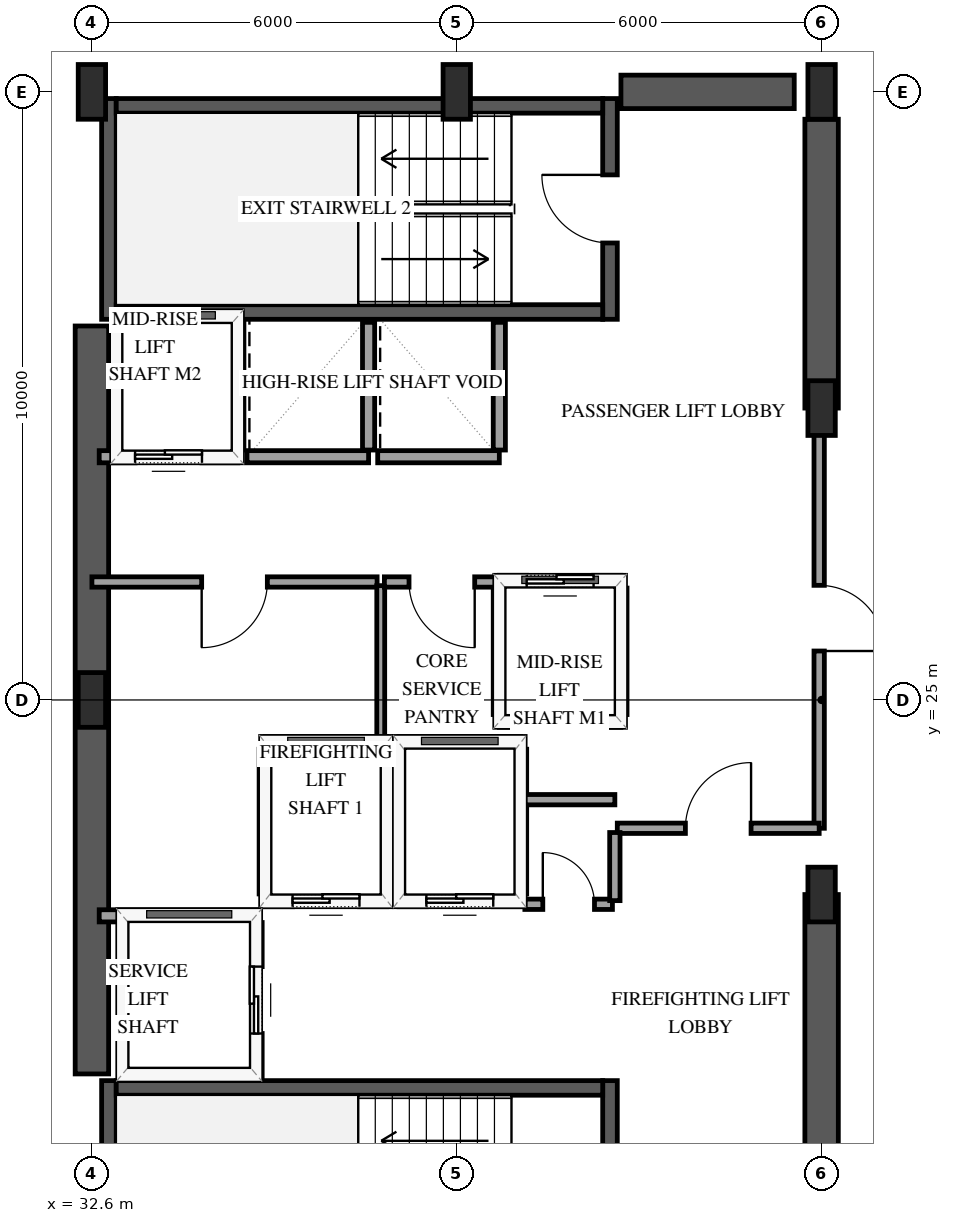
"""IFC4 building model, lengths in metres.
Left out: names, types, materials, properties, quantities, classifications, styles, units other than length and angle.
Written with IfcOpenShell. Run it as: python <this file> out.ifc"""

import sys

from ifc_helpers import new_model, si_unit, direction, frame, frame_2d, origin, origin_2d, place, context, subcontext, project, spatial, rectangle, extrude, element, fill, save


model = new_model("IFC4")
c1 = context("Model", 3, precision=1e-05, world=origin(), true_north=direction((0.0, 1.0)))
c2 = subcontext(c1, "Body", "Model", "MODEL_VIEW")
j1 = project(units=[si_unit("LENGTHUNIT", "METRE"), si_unit("PLANEANGLEUNIT", "RADIAN")], contexts=[c1])
p1 = place(None, origin())
s1 = spatial("IfcSite", under=j1, at=p1, CompositionType="ELEMENT")
p2 = place(p1, origin())
s2 = spatial("IfcBuilding", under=s1, at=p2, CompositionType="ELEMENT")
p3 = place(p2, frame((0.0, 0.0, 164.2)))
s3 = spatial("IfcBuildingStorey", under=s2, at=p3, CompositionType="ELEMENT", Elevation=164.2)
p4 = place(p3, frame((32.88, 15.11, 0.0), z_axis=(0.0, 0.0, 1.0), x_axis=(0.0, 1.0, 0.0)))
e1 = element("IfcWall", 1, at=p4, inside=s3, PredefinedType="SHEAR", context=c2, shape_type="SweptSolid", body=[
    extrude(rectangle(XDim=3.63, YDim=0.24, at=frame_2d((1.815, 0.0))), origin(), (0.0, 0.0, 1.0), 3.6),
])
p5 = place(p3, frame((41.12, 15.11, 0.0), z_axis=(0.0, 0.0, 1.0), x_axis=(0.0, 1.0, 0.0)))
e2 = element("IfcWall", 2, at=p5, inside=s3, PredefinedType="SHEAR", context=c2, shape_type="SweptSolid", body=[
    extrude(rectangle(XDim=3.63, YDim=0.24, at=frame_2d((1.815, 0.0))), origin(), (0.0, 0.0, 1.0), 3.6),
])
p6 = place(p5, frame((1.255, 0.0, 0.0)))
e3 = element("IfcOpeningElement", 3, at=p6, cuts=e2, PredefinedType="OPENING", context=c2, shape_type="SweptSolid", body=[
    extrude(rectangle(XDim=1.12, YDim=2.15, at=frame_2d((0.56, 1.075))), frame((0.0, 0.13, 0.0), z_axis=(0.0, -1.0, 0.0), x_axis=(1.0, 0.0, 0.0)), (0.0, 0.0, 1.0), 0.26),
])
p7 = place(p3, frame((33.0, 18.62, 0.0), z_axis=(0.0, 0.0, 1.0), x_axis=(1.0, 0.0, 0.0)))
e4 = element("IfcWall", 4, at=p7, inside=s3, PredefinedType="SHEAR", context=c2, shape_type="SweptSolid", body=[
    extrude(rectangle(XDim=8.0, YDim=0.24, at=frame_2d((4.0, 0.0))), origin(), (0.0, 0.0, 1.0), 3.6),
])
p8 = place(p3, frame((32.88, 31.26, 0.0), z_axis=(0.0, 0.0, 1.0), x_axis=(0.0, 1.0, 0.0)))
e5 = element("IfcWall", 5, at=p8, inside=s3, PredefinedType="SHEAR", context=c2, shape_type="SweptSolid", body=[
    extrude(rectangle(XDim=3.63, YDim=0.24, at=frame_2d((1.815, 0.0))), origin(), (0.0, 0.0, 1.0), 3.6),
])
p9 = place(p3, frame((41.12, 31.26, 0.0), z_axis=(0.0, 0.0, 1.0), x_axis=(0.0, 1.0, 0.0)))
e6 = element("IfcWall", 6, at=p9, inside=s3, PredefinedType="SHEAR", context=c2, shape_type="SweptSolid", body=[
    extrude(rectangle(XDim=3.63, YDim=0.24, at=frame_2d((1.815, 0.0))), origin(), (0.0, 0.0, 1.0), 3.6),
])
p10 = place(p9, frame((1.255, 0.0, 0.0)))
e7 = element("IfcOpeningElement", 7, at=p10, cuts=e6, PredefinedType="OPENING", context=c2, shape_type="SweptSolid", body=[
    extrude(rectangle(XDim=1.12, YDim=2.15, at=frame_2d((0.56, 1.075))), frame((0.0, 0.13, 0.0), z_axis=(0.0, -1.0, 0.0), x_axis=(1.0, 0.0, 0.0)), (0.0, 0.0, 1.0), 0.26),
])
for number, where, z_axis, x_axis in (
    (8, (33.0, 31.38, 0.0), (0.0, 0.0, 1.0), (1.0, 0.0, 0.0)),
    (9, (33.0, 34.77, 0.0), (0.0, 0.0, 1.0), (1.0, 0.0, 0.0)),
):
    element("IfcWall", number, at=place(p3, frame(where, z_axis=z_axis, x_axis=x_axis)), inside=s3, PredefinedType="SHEAR", context=c2, shape_type="SweptSolid", body=[
        extrude(rectangle(XDim=8.0, YDim=0.24, at=frame_2d((4.0, 0.0))), origin(), (0.0, 0.0, 1.0), 3.6),
    ])
p11 = place(p3, frame((32.6, 18.85, 0.0), z_axis=(0.0, 0.0, 1.0), x_axis=(0.0, 1.0, 0.0)))
e10 = element("IfcWall", 10, at=p11, inside=s3, PredefinedType="SHEAR", context=c2, shape_type="SweptSolid", body=[
    extrude(rectangle(XDim=12.3, YDim=0.55, at=frame_2d((6.15, 0.0))), origin(), (0.0, 0.0, 1.0), 3.6),
])
p12 = place(p3, frame((41.3, 35.0, 0.0), z_axis=(0.0, 0.0, 1.0), x_axis=(1.0, 0.0, 0.0)))
e11 = element("IfcWall", 11, at=p12, inside=s3, PredefinedType="SHEAR", context=c2, shape_type="SweptSolid", body=[
    extrude(rectangle(XDim=2.85, YDim=0.55, at=frame_2d((1.425, 0.0))), origin(), (0.0, 0.0, 1.0), 3.6),
])
p13 = place(p3, frame((44.6, 15.45, 0.0), z_axis=(0.0, 0.0, 1.0), x_axis=(0.0, 1.0, 0.0)))
e12 = element("IfcWall", 12, at=p13, inside=s3, PredefinedType="SHEAR", context=c2, shape_type="SweptSolid", body=[
    extrude(rectangle(XDim=6.35, YDim=0.55, at=frame_2d((3.175, 0.0))), origin(), (0.0, 0.0, 1.0), 3.6),
])
p14 = place(p3, frame((44.6, 29.8, 0.0), z_axis=(0.0, 0.0, 1.0), x_axis=(0.0, 1.0, 0.0)))
e13 = element("IfcWall", 13, at=p14, inside=s3, PredefinedType="SHEAR", context=c2, shape_type="SweptSolid", body=[
    extrude(rectangle(XDim=4.75, YDim=0.55, at=frame_2d((2.375, 0.0))), origin(), (0.0, 0.0, 1.0), 3.6),
])
for number, where, z_axis, x_axis in (
    (14, (32.6, 25.0, 0.0), (0.0, 0.0, 1.0), (1.0, 0.0, 0.0)),
    (15, (32.6, 35.0, 0.0), (0.0, 0.0, 1.0), (1.0, 0.0, 0.0)),
    (16, (38.6, 35.0, 0.0), (0.0, 0.0, 1.0), (1.0, 0.0, 0.0)),
    (17, (44.6, 21.8, 0.0), (0.0, 0.0, 1.0), (1.0, 0.0, 0.0)),
    (18, (44.6, 29.8, 0.0), (0.0, 0.0, 1.0), (1.0, 0.0, 0.0)),
    (19, (44.6, 35.0, 0.0), (0.0, 0.0, 1.0), (1.0, 0.0, 0.0)),
):
    element("IfcColumn", number, at=place(p3, frame(where, z_axis=z_axis, x_axis=x_axis)), inside=s3, PredefinedType="PILASTER", context=c2, shape_type="SweptSolid", body=[
        extrude(rectangle(XDim=0.45, YDim=0.9, at=origin_2d()), origin(), (0.0, 0.0, 1.0), 3.6),
    ])
p15 = place(p3, frame((35.45, 21.7, 0.0), z_axis=(0.0, 0.0, 1.0), x_axis=(1.0, 0.0, 0.0)))
e20 = element("IfcWall", 20, at=p15, inside=s3, PredefinedType="SOLIDWALL", context=c2, shape_type="SweptSolid", body=[
    extrude(rectangle(XDim=2.0, YDim=0.2, at=frame_2d((1.0, 0.0))), origin(), (0.0, 0.0, 1.0), 3.3),
])
p16 = place(p15, frame((0.45, 0.0, 0.0)))
e21 = element("IfcOpeningElement", 21, at=p16, cuts=e20, PredefinedType="OPENING", context=c2, shape_type="SweptSolid", body=[
    extrude(rectangle(XDim=1.1, YDim=2.15, at=frame_2d((0.55, 1.075))), frame((0.0, 0.11, 0.0), z_axis=(0.0, -1.0, 0.0), x_axis=(1.0, 0.0, 0.0)), (0.0, 0.0, 1.0), 0.22),
])
p17 = place(p3, frame((35.45, 24.3, 0.0), z_axis=(0.0, 0.0, 1.0), x_axis=(1.0, 0.0, 0.0)))
e22 = element("IfcWall", 22, at=p17, inside=s3, PredefinedType="SOLIDWALL", context=c2, shape_type="SweptSolid", body=[
    extrude(rectangle(XDim=2.0, YDim=0.2, at=frame_2d((1.0, 0.0))), origin(), (0.0, 0.0, 1.0), 3.3),
])
for number, where, z_axis, x_axis in (
    (23, (35.45, 21.81, 0.0), (0.0, 0.0, 1.0), (0.0, 1.0, 0.0)),
    (24, (37.45, 21.81, 0.0), (0.0, 0.0, 1.0), (0.0, 1.0, 0.0)),
):
    element("IfcWall", number, at=place(p3, frame(where, z_axis=z_axis, x_axis=x_axis)), inside=s3, PredefinedType="SOLIDWALL", context=c2, shape_type="SweptSolid", body=[
        extrude(rectangle(XDim=2.38, YDim=0.2, at=frame_2d((1.19, 0.0))), origin(), (0.0, 0.0, 1.0), 3.3),
    ])
p18 = place(p3, frame((37.65, 21.7, 0.0), z_axis=(0.0, 0.0, 1.0), x_axis=(1.0, 0.0, 0.0)))
e25 = element("IfcWall", 25, at=p18, inside=s3, PredefinedType="SOLIDWALL", context=c2, shape_type="SweptSolid", body=[
    extrude(rectangle(XDim=2.0, YDim=0.2, at=frame_2d((1.0, 0.0))), origin(), (0.0, 0.0, 1.0), 3.3),
])
p19 = place(p18, frame((0.45, 0.0, 0.0)))
e26 = element("IfcOpeningElement", 26, at=p19, cuts=e25, PredefinedType="OPENING", context=c2, shape_type="SweptSolid", body=[
    extrude(rectangle(XDim=1.1, YDim=2.15, at=frame_2d((0.55, 1.075))), frame((0.0, 0.11, 0.0), z_axis=(0.0, -1.0, 0.0), x_axis=(1.0, 0.0, 0.0)), (0.0, 0.0, 1.0), 0.22),
])
p20 = place(p3, frame((37.65, 24.3, 0.0), z_axis=(0.0, 0.0, 1.0), x_axis=(1.0, 0.0, 0.0)))
e27 = element("IfcWall", 27, at=p20, inside=s3, PredefinedType="SOLIDWALL", context=c2, shape_type="SweptSolid", body=[
    extrude(rectangle(XDim=2.0, YDim=0.2, at=frame_2d((1.0, 0.0))), origin(), (0.0, 0.0, 1.0), 3.3),
])
p21 = place(p3, frame((39.65, 21.81, 0.0), z_axis=(0.0, 0.0, 1.0), x_axis=(0.0, 1.0, 0.0)))
e28 = element("IfcWall", 28, at=p21, inside=s3, PredefinedType="SOLIDWALL", context=c2, shape_type="SweptSolid", body=[
    extrude(rectangle(XDim=2.38, YDim=0.2, at=frame_2d((1.19, 0.0))), origin(), (0.0, 0.0, 1.0), 3.3),
])
p22 = place(p3, frame((32.72, 21.45, 0.0), z_axis=(0.0, 0.0, 1.0), x_axis=(1.0, 0.0, 0.0)))
e29 = element("IfcWall", 29, at=p22, inside=s3, PredefinedType="SOLIDWALL", context=c2, shape_type="SweptSolid", body=[
    extrude(rectangle(XDim=2.58, YDim=0.2, at=frame_2d((1.29, 0.0))), origin(), (0.0, 0.0, 1.0), 3.3),
])
p23 = place(p3, frame((35.3, 18.79, 0.0), z_axis=(0.0, 0.0, 1.0), x_axis=(0.0, 1.0, 0.0)))
e30 = element("IfcWall", 30, at=p23, inside=s3, PredefinedType="SOLIDWALL", context=c2, shape_type="SweptSolid", body=[
    extrude(rectangle(XDim=2.55, YDim=0.2, at=frame_2d((1.275, 0.0))), origin(), (0.0, 0.0, 1.0), 3.3),
])
p24 = place(p23, frame((0.725, 0.0, 0.0)))
e31 = element("IfcOpeningElement", 31, at=p24, cuts=e30, PredefinedType="OPENING", context=c2, shape_type="SweptSolid", body=[
    extrude(rectangle(XDim=1.1, YDim=2.15, at=frame_2d((0.55, 1.075))), frame((0.0, 0.11, 0.0), z_axis=(0.0, -1.0, 0.0), x_axis=(1.0, 0.0, 0.0)), (0.0, 0.0, 1.0), 0.22),
])
p25 = place(p3, frame((39.3, 24.65, 0.0), z_axis=(0.0, 0.0, 1.0), x_axis=(1.0, 0.0, 0.0)))
e32 = element("IfcWall", 32, at=p25, inside=s3, PredefinedType="SOLIDWALL", context=c2, shape_type="SweptSolid", body=[
    extrude(rectangle(XDim=2.0, YDim=0.2, at=frame_2d((1.0, 0.0))), origin(), (0.0, 0.0, 1.0), 3.3),
])
p26 = place(p3, frame((39.3, 26.95, 0.0), z_axis=(0.0, 0.0, 1.0), x_axis=(1.0, 0.0, 0.0)))
e33 = element("IfcWall", 33, at=p26, inside=s3, PredefinedType="SOLIDWALL", context=c2, shape_type="SweptSolid", body=[
    extrude(rectangle(XDim=2.0, YDim=0.2, at=frame_2d((1.0, 0.0))), origin(), (0.0, 0.0, 1.0), 3.3),
])
p27 = place(p26, frame((0.45, 0.0, 0.0)))
e34 = element("IfcOpeningElement", 34, at=p27, cuts=e33, PredefinedType="OPENING", context=c2, shape_type="SweptSolid", body=[
    extrude(rectangle(XDim=1.1, YDim=2.15, at=frame_2d((0.55, 1.075))), frame((0.0, 0.11, 0.0), z_axis=(0.0, -1.0, 0.0), x_axis=(1.0, 0.0, 0.0)), (0.0, 0.0, 1.0), 0.22),
])
for number, where, z_axis, x_axis in (
    (35, (39.3, 24.76, 0.0), (0.0, 0.0, 1.0), (0.0, 1.0, 0.0)),
    (36, (41.3, 24.76, 0.0), (0.0, 0.0, 1.0), (0.0, 1.0, 0.0)),
):
    element("IfcWall", number, at=place(p3, frame(where, z_axis=z_axis, x_axis=x_axis)), inside=s3, PredefinedType="SOLIDWALL", context=c2, shape_type="SweptSolid", body=[
        extrude(rectangle(XDim=2.08, YDim=0.2, at=frame_2d((1.04, 0.0))), origin(), (0.0, 0.0, 1.0), 3.3),
    ])
p28 = place(p3, frame((32.72, 29.0, 0.0), z_axis=(0.0, 0.0, 1.0), x_axis=(1.0, 0.0, 0.0)))
e37 = element("IfcWall", 37, at=p28, inside=s3, PredefinedType="SOLIDWALL", context=c2, shape_type="SweptSolid", body=[
    extrude(rectangle(XDim=2.28, YDim=0.2, at=frame_2d((1.14, 0.0))), origin(), (0.0, 0.0, 1.0), 3.3),
])
p29 = place(p28, frame((0.59, 0.0, 0.0)))
e38 = element("IfcOpeningElement", 38, at=p29, cuts=e37, PredefinedType="OPENING", context=c2, shape_type="SweptSolid", body=[
    extrude(rectangle(XDim=1.1, YDim=2.15, at=frame_2d((0.55, 1.075))), frame((0.0, 0.11, 0.0), z_axis=(0.0, -1.0, 0.0), x_axis=(1.0, 0.0, 0.0)), (0.0, 0.0, 1.0), 0.22),
])
p30 = place(p3, frame((35.0, 29.11, 0.0), z_axis=(0.0, 0.0, 1.0), x_axis=(0.0, 1.0, 0.0)))
e39 = element("IfcWall", 39, at=p30, inside=s3, PredefinedType="SOLIDWALL", context=c2, shape_type="SweptSolid", body=[
    extrude(rectangle(XDim=2.1, YDim=0.2, at=frame_2d((1.05, 0.0))), origin(), (0.0, 0.0, 1.0), 3.3),
])
p31 = place(p3, frame((35.15, 29.0, 0.0), z_axis=(0.0, 0.0, 1.0), x_axis=(1.0, 0.0, 0.0)))
e40 = element("IfcWall", 40, at=p31, inside=s3, PredefinedType="SOLIDWALL", context=c2, shape_type="SweptSolid", body=[
    extrude(rectangle(XDim=2.0, YDim=0.2, at=frame_2d((1.0, 0.0))), origin(), (0.0, 0.0, 1.0), 3.3),
])
p32 = place(p3, frame((37.15, 29.11, 0.0), z_axis=(0.0, 0.0, 1.0), x_axis=(0.0, 1.0, 0.0)))
e41 = element("IfcWall", 41, at=p32, inside=s3, PredefinedType="SOLIDWALL", context=c2, shape_type="SweptSolid", body=[
    extrude(rectangle(XDim=2.1, YDim=0.2, at=frame_2d((1.05, 0.0))), origin(), (0.0, 0.0, 1.0), 3.3),
])
p33 = place(p3, frame((37.3, 29.0, 0.0), z_axis=(0.0, 0.0, 1.0), x_axis=(1.0, 0.0, 0.0)))
e42 = element("IfcWall", 42, at=p33, inside=s3, PredefinedType="SOLIDWALL", context=c2, shape_type="SweptSolid", body=[
    extrude(rectangle(XDim=2.0, YDim=0.2, at=frame_2d((1.0, 0.0))), origin(), (0.0, 0.0, 1.0), 2.674),
])
p34 = place(p3, frame((39.3, 29.11, 0.0), z_axis=(0.0, 0.0, 1.0), x_axis=(0.0, 1.0, 0.0)))
e43 = element("IfcWall", 43, at=p34, inside=s3, PredefinedType="SOLIDWALL", context=c2, shape_type="SweptSolid", body=[
    extrude(rectangle(XDim=2.1, YDim=0.2, at=frame_2d((1.05, 0.0))), origin(), (0.0, 0.0, 1.0), 3.3),
])
p35 = place(p3, frame((44.56, 29.8, 0.0), z_axis=(0.0, 0.0, 1.0), x_axis=(0.0, -1.0, 0.0)))
e44 = element("IfcWall", 44, at=p35, inside=s3, PredefinedType="PARTITIONING", context=c2, shape_type="SweptSolid", body=[
    extrude(rectangle(XDim=6.91, YDim=0.17, at=frame_2d((3.455, 0.0))), origin(), (0.0, 0.0, 1.0), 2.34),
])
p36 = place(p35, frame((2.915, 0.0, 0.0)))
e45 = element("IfcOpeningElement", 45, at=p36, cuts=e44, PredefinedType="OPENING", context=c2, shape_type="SweptSolid", body=[
    extrude(rectangle(XDim=1.08, YDim=2.15, at=frame_2d((0.54, 1.075))), frame((0.0, 0.095, 0.0), z_axis=(0.0, -1.0, 0.0), x_axis=(1.0, 0.0, 0.0)), (0.0, 0.0, 1.0), 0.19),
])
p37 = place(p3, frame((37.29, 26.94, 0.0), z_axis=(0.0, 0.0, 1.0), x_axis=(-1.0, 0.0, 0.0)))
e46 = element("IfcWall", 46, at=p37, inside=s3, PredefinedType="PARTITIONING", context=c2, shape_type="SweptSolid", body=[
    extrude(rectangle(XDim=4.69, YDim=0.17, at=frame_2d((2.345, 0.0))), origin(), (0.0, 0.0, 1.0), 3.3),
])
p38 = place(p37, frame((1.805, 0.0, 0.0)))
e47 = element("IfcOpeningElement", 47, at=p38, cuts=e46, PredefinedType="OPENING", context=c2, shape_type="SweptSolid", body=[
    extrude(rectangle(XDim=1.08, YDim=2.15, at=frame_2d((0.54, 1.075))), frame((0.0, 0.095, 0.0), z_axis=(0.0, -1.0, 0.0), x_axis=(1.0, 0.0, 0.0)), (0.0, 0.0, 1.0), 0.19),
])
p39 = place(p3, frame((41.24, 22.89, 0.0), z_axis=(0.0, 0.0, 1.0), x_axis=(1.0, 0.0, 0.0)))
e48 = element("IfcWall", 48, at=p39, inside=s3, PredefinedType="PARTITIONING", context=c2, shape_type="SweptSolid", body=[
    extrude(rectangle(XDim=3.32, YDim=0.17, at=frame_2d((1.66, 0.0))), origin(), (0.0, 0.0, 1.0), 3.3),
])
p40 = place(p39, frame((1.12, 0.0, 0.0)))
e49 = element("IfcOpeningElement", 49, at=p40, cuts=e48, PredefinedType="OPENING", context=c2, shape_type="SweptSolid", body=[
    extrude(rectangle(XDim=1.08, YDim=2.15, at=frame_2d((0.54, 1.075))), frame((0.0, 0.095, 0.0), z_axis=(0.0, -1.0, 0.0), x_axis=(1.0, 0.0, 0.0)), (0.0, 0.0, 1.0), 0.19),
])
p41 = place(p3, frame((37.35, 26.88, 0.0), z_axis=(0.0, 0.0, 1.0), x_axis=(0.0, -1.0, 0.0)))
e50 = element("IfcWall", 50, at=p41, inside=s3, PredefinedType="PARTITIONING", context=c2, shape_type="SweptSolid", body=[
    extrude(rectangle(XDim=2.58, YDim=0.13, at=frame_2d((1.29, 0.0))), origin(), (0.0, 0.0, 1.0), 3.3),
])
p42 = place(p3, frame((39.3, 26.94, 0.0), z_axis=(0.0, 0.0, 1.0), x_axis=(-1.0, 0.0, 0.0)))
e51 = element("IfcWall", 51, at=p42, inside=s3, PredefinedType="PARTITIONING", context=c2, shape_type="SweptSolid", body=[
    extrude(rectangle(XDim=1.89, YDim=0.17, at=frame_2d((0.945, 0.0))), origin(), (0.0, 0.0, 1.0), 3.3),
])
p43 = place(p42, frame((0.405, 0.0, 0.0)))
e52 = element("IfcOpeningElement", 52, at=p43, cuts=e51, PredefinedType="OPENING", context=c2, shape_type="SweptSolid", body=[
    extrude(rectangle(XDim=1.08, YDim=2.15, at=frame_2d((0.54, 1.075))), frame((0.0, 0.095, 0.0), z_axis=(0.0, -1.0, 0.0), x_axis=(1.0, 0.0, 0.0)), (0.0, 0.0, 1.0), 0.19),
])
p44 = place(p3, frame((39.72, 21.64, 0.0), z_axis=(0.0, 0.0, 1.0), x_axis=(1.0, 0.0, 0.0)))
e53 = element("IfcWall", 53, at=p44, inside=s3, PredefinedType="PARTITIONING", context=c2, shape_type="SweptSolid", body=[
    extrude(rectangle(XDim=1.44, YDim=0.17, at=frame_2d((0.72, 0.0))), origin(), (0.0, 0.0, 1.0), 3.3),
])
p45 = place(p44, frame((0.295, 0.0, 0.0)))
e54 = element("IfcOpeningElement", 54, at=p45, cuts=e53, PredefinedType="OPENING", context=c2, shape_type="SweptSolid", body=[
    extrude(rectangle(XDim=0.85, YDim=2.1, at=frame_2d((0.425, 1.05))), frame((0.0, 0.095, 0.0), z_axis=(0.0, -1.0, 0.0), x_axis=(1.0, 0.0, 0.0)), (0.0, 0.0, 1.0), 0.19),
])
p46 = place(p3, frame((41.2, 21.7, 0.0), z_axis=(0.0, 0.0, 1.0), x_axis=(0.0, 1.0, 0.0)))
e55 = element("IfcWall", 55, at=p46, inside=s3, PredefinedType="PARTITIONING", context=c2, shape_type="SweptSolid", body=[
    extrude(rectangle(XDim=1.12, YDim=0.17, at=frame_2d((0.56, 0.0))), origin(), (0.0, 0.0, 1.0), 3.3),
])
p47 = place(p3, frame((41.2, 23.36, 0.0), z_axis=(0.0, 0.0, 1.0), x_axis=(-1.0, 0.0, 0.0)))
e56 = element("IfcWall", 56, at=p47, inside=s3, PredefinedType="PARTITIONING", context=c2, shape_type="SweptSolid", body=[
    extrude(rectangle(XDim=1.48, YDim=0.17, at=frame_2d((0.74, 0.0))), origin(), (0.0, 0.0, 1.0), 3.3),
])
p48 = place(p16, origin())
e57 = element("IfcDoor", 57, at=p48, inside=s3, OperationType="SLIDING_TO_LEFT", PredefinedType="DOOR", context=c2, shape_type="SweptSolid", body=[
    extrude(rectangle(XDim=1.1, YDim=2.15, at=frame_2d((0.55, 1.075))), frame((0.0, 0.025, 0.0), z_axis=(0.0, -1.0, 0.0), x_axis=(1.0, 0.0, 0.0)), (0.0, 0.0, 1.0), 0.05),
])
fill(e21, e57)
p49 = place(p19, origin())
e58 = element("IfcDoor", 58, at=p49, inside=s3, OperationType="SLIDING_TO_LEFT", PredefinedType="DOOR", context=c2, shape_type="SweptSolid", body=[
    extrude(rectangle(XDim=1.1, YDim=2.15, at=frame_2d((0.55, 1.075))), frame((0.0, 0.025, 0.0), z_axis=(0.0, -1.0, 0.0), x_axis=(1.0, 0.0, 0.0)), (0.0, 0.0, 1.0), 0.05),
])
fill(e26, e58)
p50 = place(p24, origin())
e59 = element("IfcDoor", 59, at=p50, inside=s3, OperationType="SLIDING_TO_LEFT", PredefinedType="DOOR", context=c2, shape_type="SweptSolid", body=[
    extrude(rectangle(XDim=1.1, YDim=2.15, at=frame_2d((0.55, 1.075))), frame((0.0, 0.025, 0.0), z_axis=(0.0, -1.0, 0.0), x_axis=(1.0, 0.0, 0.0)), (0.0, 0.0, 1.0), 0.05),
])
fill(e31, e59)
p51 = place(p27, origin())
e60 = element("IfcDoor", 60, at=p51, inside=s3, OperationType="SLIDING_TO_LEFT", PredefinedType="DOOR", context=c2, shape_type="SweptSolid", body=[
    extrude(rectangle(XDim=1.1, YDim=2.15, at=frame_2d((0.55, 1.075))), frame((0.0, 0.025, 0.0), z_axis=(0.0, -1.0, 0.0), x_axis=(1.0, 0.0, 0.0)), (0.0, 0.0, 1.0), 0.05),
])
fill(e34, e60)
p52 = place(p29, origin())
e61 = element("IfcDoor", 61, at=p52, inside=s3, OperationType="SLIDING_TO_LEFT", PredefinedType="DOOR", context=c2, shape_type="SweptSolid", body=[
    extrude(rectangle(XDim=1.1, YDim=2.15, at=frame_2d((0.55, 1.075))), frame((0.0, 0.025, 0.0), z_axis=(0.0, -1.0, 0.0), x_axis=(1.0, 0.0, 0.0)), (0.0, 0.0, 1.0), 0.05),
])
fill(e38, e61)
p53 = place(p10, origin())
e62 = element("IfcDoor", 62, at=p53, inside=s3, OperationType="SINGLE_SWING_RIGHT", PredefinedType="DOOR", context=c2, shape_type="SweptSolid", body=[
    extrude(rectangle(XDim=1.12, YDim=2.15, at=frame_2d((0.56, 1.075))), frame((0.0, 0.025, 0.0), z_axis=(0.0, -1.0, 0.0), x_axis=(1.0, 0.0, 0.0)), (0.0, 0.0, 1.0), 0.05),
])
fill(e7, e62)
p54 = place(p36, origin())
e63 = element("IfcDoor", 63, at=p54, inside=s3, OperationType="SINGLE_SWING_RIGHT", PredefinedType="DOOR", context=c2, shape_type="SweptSolid", body=[
    extrude(rectangle(XDim=1.08, YDim=2.15, at=frame_2d((0.54, 1.075))), frame((0.0, 0.025, 0.0), z_axis=(0.0, -1.0, 0.0), x_axis=(1.0, 0.0, 0.0)), (0.0, 0.0, 1.0), 0.05),
])
fill(e45, e63)
p55 = place(p38, origin())
e64 = element("IfcDoor", 64, at=p55, inside=s3, OperationType="SINGLE_SWING_RIGHT", PredefinedType="DOOR", context=c2, shape_type="SweptSolid", body=[
    extrude(rectangle(XDim=1.08, YDim=2.15, at=frame_2d((0.54, 1.075))), frame((0.0, 0.025, 0.0), z_axis=(0.0, -1.0, 0.0), x_axis=(1.0, 0.0, 0.0)), (0.0, 0.0, 1.0), 0.05),
])
fill(e47, e64)
p56 = place(p40, origin())
e65 = element("IfcDoor", 65, at=p56, inside=s3, OperationType="SINGLE_SWING_RIGHT", PredefinedType="DOOR", context=c2, shape_type="SweptSolid", body=[
    extrude(rectangle(XDim=1.08, YDim=2.15, at=frame_2d((0.54, 1.075))), frame((0.0, 0.025, 0.0), z_axis=(0.0, -1.0, 0.0), x_axis=(1.0, 0.0, 0.0)), (0.0, 0.0, 1.0), 0.05),
])
fill(e49, e65)
p57 = place(p43, origin())
e66 = element("IfcDoor", 66, at=p57, inside=s3, OperationType="SINGLE_SWING_LEFT", PredefinedType="DOOR", context=c2, shape_type="SweptSolid", body=[
    extrude(rectangle(XDim=1.08, YDim=2.15, at=frame_2d((0.54, 1.075))), frame((0.0, 0.025, 0.0), z_axis=(0.0, -1.0, 0.0), x_axis=(1.0, 0.0, 0.0)), (0.0, 0.0, 1.0), 0.05),
])
fill(e52, e66)
p58 = place(p45, origin())
e67 = element("IfcDoor", 67, at=p58, inside=s3, OperationType="SINGLE_SWING_LEFT", PredefinedType="DOOR", context=c2, shape_type="SweptSolid", body=[
    extrude(rectangle(XDim=0.85, YDim=2.1, at=frame_2d((0.425, 1.05))), frame((0.0, 0.025, 0.0), z_axis=(0.0, -1.0, 0.0), x_axis=(1.0, 0.0, 0.0)), (0.0, 0.0, 1.0), 0.05),
])
fill(e54, e67)
save(model, sys.argv[1])
